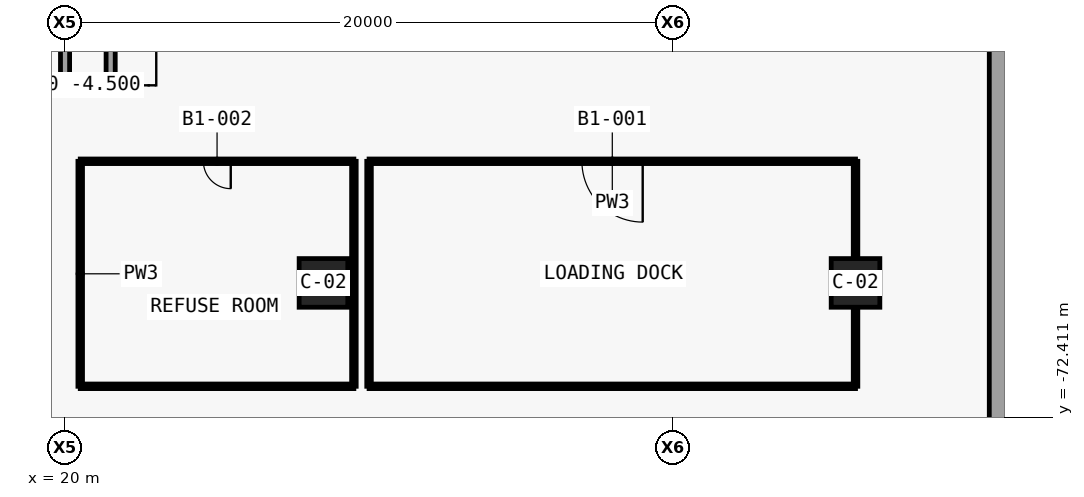
"""IFC4 building model, lengths in metres.
Left out: names, types, materials, properties, quantities, classifications, styles, units other than length and angle.
Written with IfcOpenShell. Run it as: python <this file> out.ifc"""

import sys

from ifc_helpers import new_model, si_unit, direction, frame, frame_2d, origin, origin_2d, place, context, subcontext, project, spatial, polyline, rectangle, outline, extrude, element, fill, save


model = new_model("IFC4")
c1 = context("Model", 3, precision=1e-05, world=origin(), true_north=direction((0.0, 1.0)))
c2 = subcontext(c1, "Body", "Model", "MODEL_VIEW")
j1 = project(units=[si_unit("LENGTHUNIT", "METRE"), si_unit("PLANEANGLEUNIT", "RADIAN")], contexts=[c1])
p1 = place(None, origin())
s1 = spatial("IfcSite", under=j1, at=p1, CompositionType="ELEMENT")
p2 = place(p1, origin())
s2 = spatial("IfcBuilding", under=s1, at=p2, CompositionType="ELEMENT")
p3 = place(p2, frame((0.0, 0.0, -4.5)))
s3 = spatial("IfcBuildingStorey", under=s2, at=p3, CompositionType="ELEMENT", Elevation=-4.5)
p4 = place(p3, frame((50.7, -83.0, 0.0), z_axis=(0.0, 0.0, 1.0), x_axis=(0.0, 1.0, 0.0)))
e1 = element("IfcWall", 1, at=p4, inside=s3, PredefinedType="SOLIDWALL", context=c2, shape_type="SweptSolid", body=[
    extrude(outline(polyline([(0.6, -0.3), (0.6, 0.3), (81.4, 0.3), (82.0, 0.3), (82.0, -0.3), (0.6, -0.3)])), origin(), (0.0, 0.0, 1.0), 4.5),
])
for number, where, z_axis, x_axis in (
    (2, (28.5, -68.0, 0.0), (0.0, 0.0, 1.0), (1.0, 0.0, 0.0)),
    (3, (46.0, -68.0, 0.0), (0.0, 0.0, 1.0), (1.0, 0.0, 0.0)),
):
    element("IfcColumn", number, at=place(p3, frame(where, z_axis=z_axis, x_axis=x_axis)), inside=s3, PredefinedType="COLUMN", context=c2, shape_type="SweptSolid", body=[
        extrude(rectangle(XDim=1.6, YDim=1.6, at=origin_2d()), origin(), (0.0, 0.0, 1.0), 4.5),
    ])
p5 = place(p3, frame((20.0, -61.5, 0.0), z_axis=(0.0, 0.0, 1.0), x_axis=(0.0, 1.0, 0.0)))
e4 = element("IfcWall", 4, at=p5, inside=s3, PredefinedType="SOLIDWALL", context=c2, shape_type="SweptSolid", body=[
    extrude(rectangle(XDim=7.0, YDim=0.3, at=frame_2d((3.5, 0.0))), origin(), (0.0, 0.0, 1.0), 3.917),
])
p6 = place(p3, frame((21.5, -61.5, 0.0), z_axis=(0.0, 0.0, 1.0), x_axis=(0.0, 1.0, 0.0)))
e5 = element("IfcWall", 5, at=p6, inside=s3, PredefinedType="SOLIDWALL", context=c2, shape_type="SweptSolid", body=[
    extrude(rectangle(XDim=7.0, YDim=0.3, at=frame_2d((3.5, 0.0))), origin(), (0.0, 0.0, 1.0), 4.066),
])
p7 = place(p3, frame((46.0, -63.999, 0.0), z_axis=(0.0, 0.0, 1.0), x_axis=(-1.0, 0.0, 0.0)))
e6 = element("IfcWall", 6, at=p7, inside=s3, PredefinedType="PARTITIONING", context=c2, shape_type="SweptSolid", body=[
    extrude(rectangle(XDim=16.0, YDim=0.15, at=frame_2d((8.0, 0.0))), origin(), (0.0, 0.0, 1.0), 3.03),
])
p8 = place(p7, frame((7.0, 0.0, 0.0)))
e7 = element("IfcOpeningElement", 7, at=p8, cuts=e6, PredefinedType="OPENING", context=c2, shape_type="SweptSolid", body=[
    extrude(rectangle(XDim=2.0, YDim=2.4, at=frame_2d((1.0, 1.2))), frame((0.0, 0.085, 0.0), z_axis=(0.0, -1.0, 0.0), x_axis=(1.0, 0.0, 0.0)), (0.0, 0.0, 1.0), 0.17),
])
p9 = place(p3, frame((29.999, -64.0, 0.0), z_axis=(0.0, 0.0, 1.0), x_axis=(0.0, -1.0, 0.0)))
e8 = element("IfcWall", 8, at=p9, inside=s3, PredefinedType="PARTITIONING", context=c2, shape_type="SweptSolid", body=[
    extrude(rectangle(XDim=7.4, YDim=0.15, at=frame_2d((3.7, 0.0))), origin(), (0.0, 0.0, 1.0), 3.03),
])
p10 = place(p3, frame((30.0, -71.401, 0.0), z_axis=(0.0, 0.0, 1.0), x_axis=(1.0, 0.0, 0.0)))
e9 = element("IfcWall", 9, at=p10, inside=s3, PredefinedType="PARTITIONING", context=c2, shape_type="SweptSolid", body=[
    extrude(rectangle(XDim=16.0, YDim=0.15, at=frame_2d((8.0, 0.0))), origin(), (0.0, 0.0, 1.0), 4.05),
])
p11 = place(p3, frame((46.001, -71.4, 0.0), z_axis=(0.0, 0.0, 1.0), x_axis=(0.0, 1.0, 0.0)))
e10 = element("IfcWall", 10, at=p11, inside=s3, PredefinedType="PARTITIONING", context=c2, shape_type="SweptSolid", body=[
    extrude(rectangle(XDim=2.58, YDim=0.15, at=frame_2d((1.29, 0.0))), origin(), (0.0, 0.0, 1.0), 4.05),
])
p12 = place(p3, frame((46.001, -67.18, 0.0), z_axis=(0.0, 0.0, 1.0), x_axis=(0.0, 1.0, 0.0)))
e11 = element("IfcWall", 11, at=p12, inside=s3, PredefinedType="PARTITIONING", context=c2, shape_type="SweptSolid", body=[
    extrude(rectangle(XDim=3.18, YDim=0.15, at=frame_2d((1.59, 0.0))), origin(), (0.0, 0.0, 1.0), 3.03),
])
p13 = place(p3, frame((29.5, -63.999, 0.0), z_axis=(0.0, 0.0, 1.0), x_axis=(-1.0, 0.0, 0.0)))
e12 = element("IfcWall", 12, at=p13, inside=s3, PredefinedType="PARTITIONING", context=c2, shape_type="SweptSolid", body=[
    extrude(rectangle(XDim=9.0, YDim=0.15, at=frame_2d((4.5, 0.0))), origin(), (0.0, 0.0, 1.0), 3.03),
])
p14 = place(p13, frame((4.05, 0.0, 0.0)))
e13 = element("IfcOpeningElement", 13, at=p14, cuts=e12, PredefinedType="OPENING", context=c2, shape_type="SweptSolid", body=[
    extrude(rectangle(XDim=0.9, YDim=2.1, at=frame_2d((0.45, 1.05))), frame((0.0, 0.085, 0.0), z_axis=(0.0, -1.0, 0.0), x_axis=(1.0, 0.0, 0.0)), (0.0, 0.0, 1.0), 0.17),
])
p15 = place(p3, frame((20.499, -64.0, 0.0), z_axis=(0.0, 0.0, 1.0), x_axis=(0.0, -1.0, 0.0)))
e14 = element("IfcWall", 14, at=p15, inside=s3, PredefinedType="PARTITIONING", context=c2, shape_type="SweptSolid", body=[
    extrude(rectangle(XDim=7.4, YDim=0.15, at=frame_2d((3.7, 0.0))), origin(), (0.0, 0.0, 1.0), 3.03),
])
p16 = place(p3, frame((20.5, -71.401, 0.0), z_axis=(0.0, 0.0, 1.0), x_axis=(1.0, 0.0, 0.0)))
e15 = element("IfcWall", 15, at=p16, inside=s3, PredefinedType="PARTITIONING", context=c2, shape_type="SweptSolid", body=[
    extrude(rectangle(XDim=9.0, YDim=0.15, at=frame_2d((4.5, 0.0))), origin(), (0.0, 0.0, 1.0), 3.03),
])
p17 = place(p3, frame((29.501, -71.4, 0.0), z_axis=(0.0, 0.0, 1.0), x_axis=(0.0, 1.0, 0.0)))
e16 = element("IfcWall", 16, at=p17, inside=s3, PredefinedType="PARTITIONING", context=c2, shape_type="SweptSolid", body=[
    extrude(rectangle(XDim=7.4, YDim=0.15, at=frame_2d((3.7, 0.0))), origin(), (0.0, 0.0, 1.0), 3.03),
])
p18 = place(p8, origin())
e17 = element("IfcDoor", 17, at=p18, inside=s3, OperationType="DOUBLE_DOOR_SINGLE_SWING", PredefinedType="DOOR", context=c2, shape_type="SweptSolid", body=[
    extrude(rectangle(XDim=2.0, YDim=2.4, at=frame_2d((1.0, 1.2))), frame((0.0, 0.025, 0.0), z_axis=(0.0, -1.0, 0.0), x_axis=(1.0, 0.0, 0.0)), (0.0, 0.0, 1.0), 0.05),
])
fill(e7, e17)
p19 = place(p14, origin())
e18 = element("IfcDoor", 18, at=p19, inside=s3, OperationType="SINGLE_SWING_LEFT", PredefinedType="DOOR", context=c2, shape_type="SweptSolid", body=[
    extrude(rectangle(XDim=0.9, YDim=2.1, at=frame_2d((0.45, 1.05))), frame((0.0, 0.025, 0.0), z_axis=(0.0, -1.0, 0.0), x_axis=(1.0, 0.0, 0.0)), (0.0, 0.0, 1.0), 0.05),
])
fill(e13, e18)
save(model, sys.argv[1])
